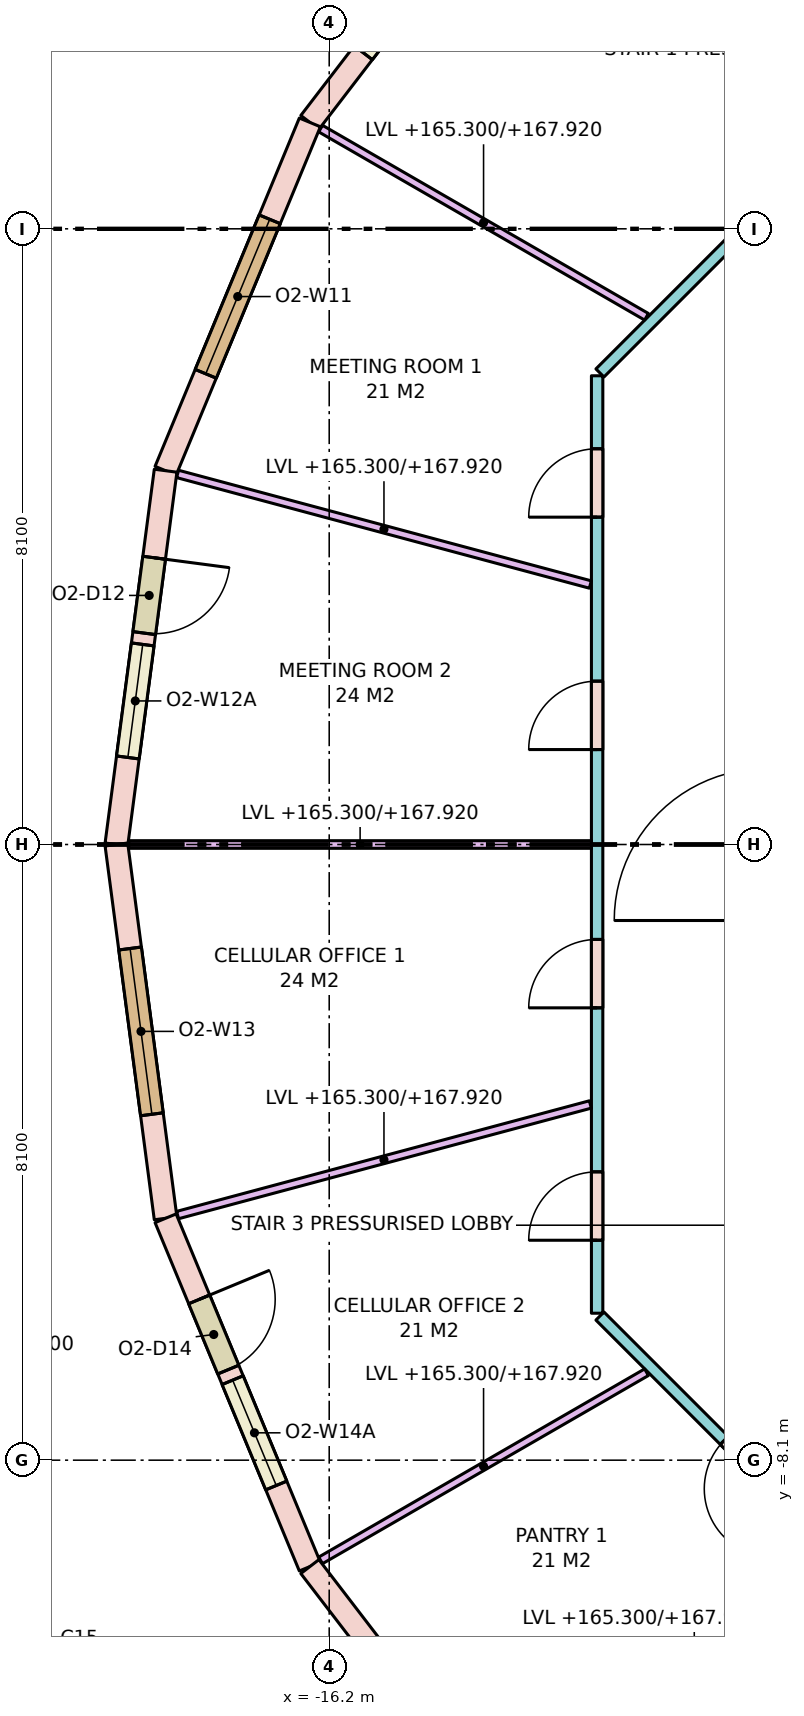
"""IFC4 building model, lengths in metres.
Left out: names, types, materials, properties, quantities, classifications, styles, units other than length and angle.
Written with IfcOpenShell. Run it as: python <this file> out.ifc"""

import sys

from ifc_helpers import new_model, si_unit, direction, frame, frame_2d, origin, place, context, subcontext, project, spatial, rectangle, extrude, element, fill, save


model = new_model("IFC4")
c1 = context("Model", 3, precision=1e-05, world=origin(), true_north=direction((0.0, 1.0)))
c2 = subcontext(c1, "Body", "Model", "MODEL_VIEW")
j1 = project(units=[si_unit("LENGTHUNIT", "METRE"), si_unit("PLANEANGLEUNIT", "RADIAN")], contexts=[c1])
p1 = place(None, origin())
s1 = spatial("IfcSite", under=j1, at=p1, CompositionType="ELEMENT")
p2 = place(p1, origin())
s2 = spatial("IfcBuilding", under=s1, at=p2, CompositionType="ELEMENT")
p3 = place(p2, frame((0.0, 0.0, 165.3)))
s3 = spatial("IfcBuildingStorey", under=s2, at=p3, CompositionType="ELEMENT", Elevation=165.3)
p4 = place(p3, frame((-13.435, 13.435, 0.0), z_axis=(0.0, 0.0, 1.0), x_axis=(-0.608768356425, -0.793348024649, 0.0)))
e1 = element("IfcWall", 1, at=p4, inside=s3, PredefinedType="STANDARD", context=c2, shape_type="SweptSolid", body=[
    extrude(rectangle(XDim=4.96, YDim=0.3, at=frame_2d((2.48, 0.0))), origin(), (0.0, 0.0, 1.0), 3.42),
])
p5 = place(p4, frame((1.155, 0.0, 0.0)))
e2 = element("IfcOpeningElement", 2, at=p5, cuts=e1, PredefinedType="OPENING", context=c2, shape_type="SweptSolid", body=[
    extrude(rectangle(XDim=1.0, YDim=2.4, at=frame_2d((0.5, 1.2))), frame((0.0, 0.16, 0.0), z_axis=(0.0, -1.0, 0.0), x_axis=(1.0, 0.0, 0.0)), (0.0, 0.0, 1.0), 0.32),
])
p6 = place(p4, frame((2.305, 0.0, 0.8)))
e3 = element("IfcOpeningElement", 3, at=p6, cuts=e1, PredefinedType="OPENING", context=c2, shape_type="SweptSolid", body=[
    extrude(rectangle(XDim=1.5, YDim=2.4, at=frame_2d((0.75, 1.2))), frame((0.0, 0.16, 0.0), z_axis=(0.0, -1.0, 0.0), x_axis=(1.0, 0.0, 0.0)), (0.0, 0.0, 1.0), 0.32),
])
p7 = place(p3, frame((-16.455, 9.5, 0.0), z_axis=(0.0, 0.0, 1.0), x_axis=(-0.382650301762, -0.923893254961, 0.0)))
e4 = element("IfcWall", 4, at=p7, inside=s3, PredefinedType="STANDARD", context=c2, shape_type="SweptSolid", body=[
    extrude(rectangle(XDim=4.96, YDim=0.3, at=frame_2d((2.48, 0.0))), origin(), (0.0, 0.0, 1.0), 3.42),
])
p8 = place(p7, frame((1.38, 0.0, 0.8)))
e5 = element("IfcOpeningElement", 5, at=p8, cuts=e4, PredefinedType="OPENING", context=c2, shape_type="SweptSolid", body=[
    extrude(rectangle(XDim=2.2, YDim=2.4, at=frame_2d((1.1, 1.2))), frame((0.0, 0.16, 0.0), z_axis=(0.0, -1.0, 0.0), x_axis=(1.0, 0.0, 0.0)), (0.0, 0.0, 1.0), 0.32),
])
p9 = place(p3, frame((-18.353, 4.917, 0.0), z_axis=(0.0, 0.0, 1.0), x_axis=(-0.130538549191, -0.991443234469, 0.0)))
e6 = element("IfcWall", 6, at=p9, inside=s3, PredefinedType="STANDARD", context=c2, shape_type="SweptSolid", body=[
    extrude(rectangle(XDim=4.96, YDim=0.3, at=frame_2d((2.48, 0.0))), origin(), (0.0, 0.0, 1.0), 3.42),
])
p10 = place(p9, frame((1.155, 0.0, 0.0)))
e7 = element("IfcOpeningElement", 7, at=p10, cuts=e6, PredefinedType="OPENING", context=c2, shape_type="SweptSolid", body=[
    extrude(rectangle(XDim=1.0, YDim=2.4, at=frame_2d((0.5, 1.2))), frame((0.0, 0.16, 0.0), z_axis=(0.0, -1.0, 0.0), x_axis=(1.0, 0.0, 0.0)), (0.0, 0.0, 1.0), 0.32),
])
p11 = place(p9, frame((2.305, 0.0, 0.8)))
e8 = element("IfcOpeningElement", 8, at=p11, cuts=e6, PredefinedType="OPENING", context=c2, shape_type="SweptSolid", body=[
    extrude(rectangle(XDim=1.5, YDim=2.4, at=frame_2d((0.75, 1.2))), frame((0.0, 0.16, 0.0), z_axis=(0.0, -1.0, 0.0), x_axis=(1.0, 0.0, 0.0)), (0.0, 0.0, 1.0), 0.32),
])
p12 = place(p3, frame((-19.0, 0.0, 0.0), z_axis=(0.0, 0.0, 1.0), x_axis=(0.130538549191, -0.991443234469, 0.0)))
e9 = element("IfcWall", 9, at=p12, inside=s3, PredefinedType="STANDARD", context=c2, shape_type="SweptSolid", body=[
    extrude(rectangle(XDim=4.96, YDim=0.3, at=frame_2d((2.48, 0.0))), origin(), (0.0, 0.0, 1.0), 3.42),
])
p13 = place(p12, frame((1.38, 0.0, 0.8)))
e10 = element("IfcOpeningElement", 10, at=p13, cuts=e9, PredefinedType="OPENING", context=c2, shape_type="SweptSolid", body=[
    extrude(rectangle(XDim=2.2, YDim=2.4, at=frame_2d((1.1, 1.2))), frame((0.0, 0.16, 0.0), z_axis=(0.0, -1.0, 0.0), x_axis=(1.0, 0.0, 0.0)), (0.0, 0.0, 1.0), 0.32),
])
p14 = place(p3, frame((-18.353, -4.917, 0.0), z_axis=(0.0, 0.0, 1.0), x_axis=(0.382650301762, -0.923893254961, 0.0)))
e11 = element("IfcWall", 11, at=p14, inside=s3, PredefinedType="STANDARD", context=c2, shape_type="SweptSolid", body=[
    extrude(rectangle(XDim=4.96, YDim=0.3, at=frame_2d((2.48, 0.0))), origin(), (0.0, 0.0, 1.0), 3.42),
])
p15 = place(p14, frame((1.155, 0.0, 0.0)))
e12 = element("IfcOpeningElement", 12, at=p15, cuts=e11, PredefinedType="OPENING", context=c2, shape_type="SweptSolid", body=[
    extrude(rectangle(XDim=1.0, YDim=2.4, at=frame_2d((0.5, 1.2))), frame((0.0, 0.16, 0.0), z_axis=(0.0, -1.0, 0.0), x_axis=(1.0, 0.0, 0.0)), (0.0, 0.0, 1.0), 0.32),
])
p16 = place(p14, frame((2.305, 0.0, 0.8)))
e13 = element("IfcOpeningElement", 13, at=p16, cuts=e11, PredefinedType="OPENING", context=c2, shape_type="SweptSolid", body=[
    extrude(rectangle(XDim=1.5, YDim=2.4, at=frame_2d((0.75, 1.2))), frame((0.0, 0.16, 0.0), z_axis=(0.0, -1.0, 0.0), x_axis=(1.0, 0.0, 0.0)), (0.0, 0.0, 1.0), 0.32),
])
p17 = place(p3, frame((-16.455, -9.5, 0.0), z_axis=(0.0, 0.0, 1.0), x_axis=(0.608768356425, -0.793348024649, 0.0)))
e14 = element("IfcWall", 14, at=p17, inside=s3, PredefinedType="STANDARD", context=c2, shape_type="SweptSolid", body=[
    extrude(rectangle(XDim=4.96, YDim=0.3, at=frame_2d((2.48, 0.0))), origin(), (0.0, 0.0, 1.0), 3.42),
])
p18 = place(p17, frame((1.38, 0.0, 0.8)))
e15 = element("IfcOpeningElement", 15, at=p18, cuts=e14, PredefinedType="OPENING", context=c2, shape_type="SweptSolid", body=[
    extrude(rectangle(XDim=2.2, YDim=2.4, at=frame_2d((1.1, 1.2))), frame((0.0, 0.16, 0.0), z_axis=(0.0, -1.0, 0.0), x_axis=(1.0, 0.0, 0.0)), (0.0, 0.0, 1.0), 0.32),
])
p19 = place(p3, frame((-8.204, -10.638, 0.0), z_axis=(0.0, 0.0, 1.0), x_axis=(-0.707106781187, 0.707106781187, 0.0)))
e16 = element("IfcWall", 16, at=p19, inside=s3, PredefinedType="PARTITIONING", context=c2, shape_type="SweptSolid", body=[
    extrude(rectangle(XDim=6.271, YDim=0.15, at=frame_2d((3.135, 0.0))), origin(), (0.0, 0.0, 1.0), 2.62),
])
p20 = place(p19, frame((3.057, 0.0, 0.0)))
e17 = element("IfcOpeningElement", 17, at=p20, cuts=e16, PredefinedType="OPENING", context=c2, shape_type="SweptSolid", body=[
    extrude(rectangle(XDim=0.9, YDim=2.1, at=frame_2d((0.45, 1.05))), frame((0.0, 0.085, 0.0), z_axis=(0.0, -1.0, 0.0), x_axis=(1.0, 0.0, 0.0)), (0.0, 0.0, 1.0), 0.17),
])
p21 = place(p19, frame((0.436, 0.0, 0.0)))
e18 = element("IfcOpeningElement", 18, at=p21, cuts=e16, PredefinedType="OPENING", context=c2, shape_type="SweptSolid", body=[
    extrude(rectangle(XDim=0.9, YDim=2.1, at=frame_2d((0.45, 1.05))), frame((0.0, 0.085, 0.0), z_axis=(0.0, -1.0, 0.0), x_axis=(1.0, 0.0, 0.0)), (0.0, 0.0, 1.0), 0.17),
])
p22 = place(p3, frame((-12.675, -6.167, 0.0), z_axis=(0.0, 0.0, 1.0), x_axis=(0.0, 1.0, 0.0)))
e19 = element("IfcWall", 19, at=p22, inside=s3, PredefinedType="PARTITIONING", context=c2, shape_type="SweptSolid", body=[
    extrude(rectangle(XDim=12.333, YDim=0.15, at=frame_2d((6.167, 0.0))), origin(), (0.0, 0.0, 1.0), 2.62),
])
p23 = place(p22, frame((10.473, 0.0, 0.0)))
e20 = element("IfcOpeningElement", 20, at=p23, cuts=e19, PredefinedType="OPENING", context=c2, shape_type="SweptSolid", body=[
    extrude(rectangle(XDim=0.9, YDim=2.1, at=frame_2d((0.45, 1.05))), frame((0.0, 0.085, 0.0), z_axis=(0.0, -1.0, 0.0), x_axis=(1.0, 0.0, 0.0)), (0.0, 0.0, 1.0), 0.17),
])
p24 = place(p22, frame((7.416, 0.0, 0.0)))
e21 = element("IfcOpeningElement", 21, at=p24, cuts=e19, PredefinedType="OPENING", context=c2, shape_type="SweptSolid", body=[
    extrude(rectangle(XDim=0.9, YDim=2.1, at=frame_2d((0.45, 1.05))), frame((0.0, 0.085, 0.0), z_axis=(0.0, -1.0, 0.0), x_axis=(1.0, 0.0, 0.0)), (0.0, 0.0, 1.0), 0.17),
])
p25 = place(p22, frame((4.018, 0.0, 0.0)))
e22 = element("IfcOpeningElement", 22, at=p25, cuts=e19, PredefinedType="OPENING", context=c2, shape_type="SweptSolid", body=[
    extrude(rectangle(XDim=0.9, YDim=2.1, at=frame_2d((0.45, 1.05))), frame((0.0, 0.085, 0.0), z_axis=(0.0, -1.0, 0.0), x_axis=(1.0, 0.0, 0.0)), (0.0, 0.0, 1.0), 0.17),
])
p26 = place(p22, frame((0.96, 0.0, 0.0)))
e23 = element("IfcOpeningElement", 23, at=p26, cuts=e19, PredefinedType="OPENING", context=c2, shape_type="SweptSolid", body=[
    extrude(rectangle(XDim=0.9, YDim=2.1, at=frame_2d((0.45, 1.05))), frame((0.0, 0.085, 0.0), z_axis=(0.0, -1.0, 0.0), x_axis=(1.0, 0.0, 0.0)), (0.0, 0.0, 1.0), 0.17),
])
p27 = place(p3, frame((-12.638, 6.204, 0.0), z_axis=(0.0, 0.0, 1.0), x_axis=(0.707106781187, 0.707106781187, 0.0)))
e24 = element("IfcWall", 24, at=p27, inside=s3, PredefinedType="PARTITIONING", context=c2, shape_type="SweptSolid", body=[
    extrude(rectangle(XDim=6.271, YDim=0.15, at=frame_2d((3.135, 0.0))), origin(), (0.0, 0.0, 1.0), 2.62),
])
p28 = place(p3, frame((-12.025, 6.943, 0.0), z_axis=(0.0, 0.0, 1.0), x_axis=(-0.866025463095, 0.499999897272, 0.0)))
e25 = element("IfcWall", 25, at=p28, inside=s3, PredefinedType="PARTITIONING", context=c2, shape_type="SweptSolid", body=[
    extrude(rectangle(XDim=4.951, YDim=0.1, at=frame_2d((2.476, 0.0))), origin(), (0.0, 0.0, 1.0), 2.62),
])
p29 = place(p3, frame((-12.764, 3.42, 0.0), z_axis=(0.0, 0.0, 1.0), x_axis=(-0.965925759926, 0.258819292773, 0.0)))
e26 = element("IfcWall", 26, at=p29, inside=s3, PredefinedType="PARTITIONING", context=c2, shape_type="SweptSolid", body=[
    extrude(rectangle(XDim=5.622, YDim=0.1, at=frame_2d((2.811, 0.0))), origin(), (0.0, 0.0, 1.0), 2.62),
])
p30 = place(p3, frame((-12.75, 0.0, 0.0), z_axis=(0.0, 0.0, 1.0), x_axis=(-1.0, 0.0, 0.0)))
e27 = element("IfcWall", 27, at=p30, inside=s3, PredefinedType="PARTITIONING", context=c2, shape_type="SweptSolid", body=[
    extrude(rectangle(XDim=6.087, YDim=0.1, at=frame_2d((3.043, 0.0))), origin(), (0.0, 0.0, 1.0), 2.62),
])
p31 = place(p3, frame((-12.764, -3.42, 0.0), z_axis=(0.0, 0.0, 1.0), x_axis=(-0.965925759926, -0.258819292773, 0.0)))
e28 = element("IfcWall", 28, at=p31, inside=s3, PredefinedType="PARTITIONING", context=c2, shape_type="SweptSolid", body=[
    extrude(rectangle(XDim=5.622, YDim=0.1, at=frame_2d((2.811, 0.0))), origin(), (0.0, 0.0, 1.0), 2.62),
])
p32 = place(p3, frame((-12.025, -6.943, 0.0), z_axis=(0.0, 0.0, 1.0), x_axis=(-0.866025463095, -0.499999897272, 0.0)))
e29 = element("IfcWall", 29, at=p32, inside=s3, PredefinedType="PARTITIONING", context=c2, shape_type="SweptSolid", body=[
    extrude(rectangle(XDim=4.951, YDim=0.1, at=frame_2d((2.476, 0.0))), origin(), (0.0, 0.0, 1.0), 2.62),
])
p33 = place(p3, frame((-9.474, -9.474, 0.0), z_axis=(0.0, 0.0, 1.0), x_axis=(-0.707106781187, -0.707106781187, 0.0)))
e30 = element("IfcWall", 30, at=p33, inside=s3, PredefinedType="PARTITIONING", context=c2, shape_type="SweptSolid", body=[
    extrude(rectangle(XDim=5.439, YDim=0.1, at=frame_2d((2.719, 0.0))), origin(), (0.0, 0.0, 1.0), 2.62),
])
p34 = place(p6, origin())
e31 = element("IfcWindow", 31, at=p34, inside=s3, PartitioningType="SINGLE_PANEL", PredefinedType="WINDOW", context=c2, shape_type="SweptSolid", body=[
    extrude(rectangle(XDim=1.5, YDim=2.4, at=frame_2d((0.75, 1.2))), frame((0.0, 0.03, 0.0), z_axis=(0.0, -1.0, 0.0), x_axis=(1.0, 0.0, 0.0)), (0.0, 0.0, 1.0), 0.06),
])
fill(e3, e31)
p35 = place(p8, origin())
e32 = element("IfcWindow", 32, at=p35, inside=s3, PartitioningType="SINGLE_PANEL", PredefinedType="WINDOW", context=c2, shape_type="SweptSolid", body=[
    extrude(rectangle(XDim=2.2, YDim=2.4, at=frame_2d((1.1, 1.2))), frame((0.0, 0.03, 0.0), z_axis=(0.0, -1.0, 0.0), x_axis=(1.0, 0.0, 0.0)), (0.0, 0.0, 1.0), 0.06),
])
fill(e5, e32)
p36 = place(p10, origin())
e33 = element("IfcDoor", 33, at=p36, inside=s3, OperationType="SINGLE_SWING_LEFT", PredefinedType="DOOR", context=c2, shape_type="SweptSolid", body=[
    extrude(rectangle(XDim=1.0, YDim=2.4, at=frame_2d((0.5, 1.2))), frame((0.0, 0.025, 0.0), z_axis=(0.0, -1.0, 0.0), x_axis=(1.0, 0.0, 0.0)), (0.0, 0.0, 1.0), 0.05),
])
fill(e7, e33)
p37 = place(p11, origin())
e34 = element("IfcWindow", 34, at=p37, inside=s3, PartitioningType="SINGLE_PANEL", PredefinedType="WINDOW", context=c2, shape_type="SweptSolid", body=[
    extrude(rectangle(XDim=1.5, YDim=2.4, at=frame_2d((0.75, 1.2))), frame((0.0, 0.03, 0.0), z_axis=(0.0, -1.0, 0.0), x_axis=(1.0, 0.0, 0.0)), (0.0, 0.0, 1.0), 0.06),
])
fill(e8, e34)
p38 = place(p13, origin())
e35 = element("IfcWindow", 35, at=p38, inside=s3, PartitioningType="SINGLE_PANEL", PredefinedType="WINDOW", context=c2, shape_type="SweptSolid", body=[
    extrude(rectangle(XDim=2.2, YDim=2.4, at=frame_2d((1.1, 1.2))), frame((0.0, 0.03, 0.0), z_axis=(0.0, -1.0, 0.0), x_axis=(1.0, 0.0, 0.0)), (0.0, 0.0, 1.0), 0.06),
])
fill(e10, e35)
p39 = place(p15, origin())
e36 = element("IfcDoor", 36, at=p39, inside=s3, OperationType="SINGLE_SWING_LEFT", PredefinedType="DOOR", context=c2, shape_type="SweptSolid", body=[
    extrude(rectangle(XDim=1.0, YDim=2.4, at=frame_2d((0.5, 1.2))), frame((0.0, 0.025, 0.0), z_axis=(0.0, -1.0, 0.0), x_axis=(1.0, 0.0, 0.0)), (0.0, 0.0, 1.0), 0.05),
])
fill(e12, e36)
p40 = place(p16, origin())
e37 = element("IfcWindow", 37, at=p40, inside=s3, PartitioningType="SINGLE_PANEL", PredefinedType="WINDOW", context=c2, shape_type="SweptSolid", body=[
    extrude(rectangle(XDim=1.5, YDim=2.4, at=frame_2d((0.75, 1.2))), frame((0.0, 0.03, 0.0), z_axis=(0.0, -1.0, 0.0), x_axis=(1.0, 0.0, 0.0)), (0.0, 0.0, 1.0), 0.06),
])
fill(e13, e37)
p41 = place(p23, origin())
e38 = element("IfcDoor", 38, at=p41, inside=s3, OperationType="SINGLE_SWING_LEFT", PredefinedType="DOOR", context=c2, shape_type="SweptSolid", body=[
    extrude(rectangle(XDim=0.9, YDim=2.1, at=frame_2d((0.45, 1.05))), frame((0.0, 0.025, 0.0), z_axis=(0.0, -1.0, 0.0), x_axis=(1.0, 0.0, 0.0)), (0.0, 0.0, 1.0), 0.05),
])
fill(e20, e38)
p42 = place(p24, origin())
e39 = element("IfcDoor", 39, at=p42, inside=s3, OperationType="SINGLE_SWING_LEFT", PredefinedType="DOOR", context=c2, shape_type="SweptSolid", body=[
    extrude(rectangle(XDim=0.9, YDim=2.1, at=frame_2d((0.45, 1.05))), frame((0.0, 0.025, 0.0), z_axis=(0.0, -1.0, 0.0), x_axis=(1.0, 0.0, 0.0)), (0.0, 0.0, 1.0), 0.05),
])
fill(e21, e39)
p43 = place(p25, origin())
e40 = element("IfcDoor", 40, at=p43, inside=s3, OperationType="SINGLE_SWING_LEFT", PredefinedType="DOOR", context=c2, shape_type="SweptSolid", body=[
    extrude(rectangle(XDim=0.9, YDim=2.1, at=frame_2d((0.45, 1.05))), frame((0.0, 0.025, 0.0), z_axis=(0.0, -1.0, 0.0), x_axis=(1.0, 0.0, 0.0)), (0.0, 0.0, 1.0), 0.05),
])
fill(e22, e40)
p44 = place(p26, origin())
e41 = element("IfcDoor", 41, at=p44, inside=s3, OperationType="SINGLE_SWING_LEFT", PredefinedType="DOOR", context=c2, shape_type="SweptSolid", body=[
    extrude(rectangle(XDim=0.9, YDim=2.1, at=frame_2d((0.45, 1.05))), frame((0.0, 0.025, 0.0), z_axis=(0.0, -1.0, 0.0), x_axis=(1.0, 0.0, 0.0)), (0.0, 0.0, 1.0), 0.05),
])
fill(e23, e41)
p45 = place(p20, origin())
e42 = element("IfcDoor", 42, at=p45, inside=s3, OperationType="SINGLE_SWING_LEFT", PredefinedType="DOOR", context=c2, shape_type="SweptSolid", body=[
    extrude(rectangle(XDim=0.9, YDim=2.1, at=frame_2d((0.45, 1.05))), frame((0.0, 0.025, 0.0), z_axis=(0.0, -1.0, 0.0), x_axis=(1.0, 0.0, 0.0)), (0.0, 0.0, 1.0), 0.05),
])
fill(e17, e42)
save(model, sys.argv[1])
